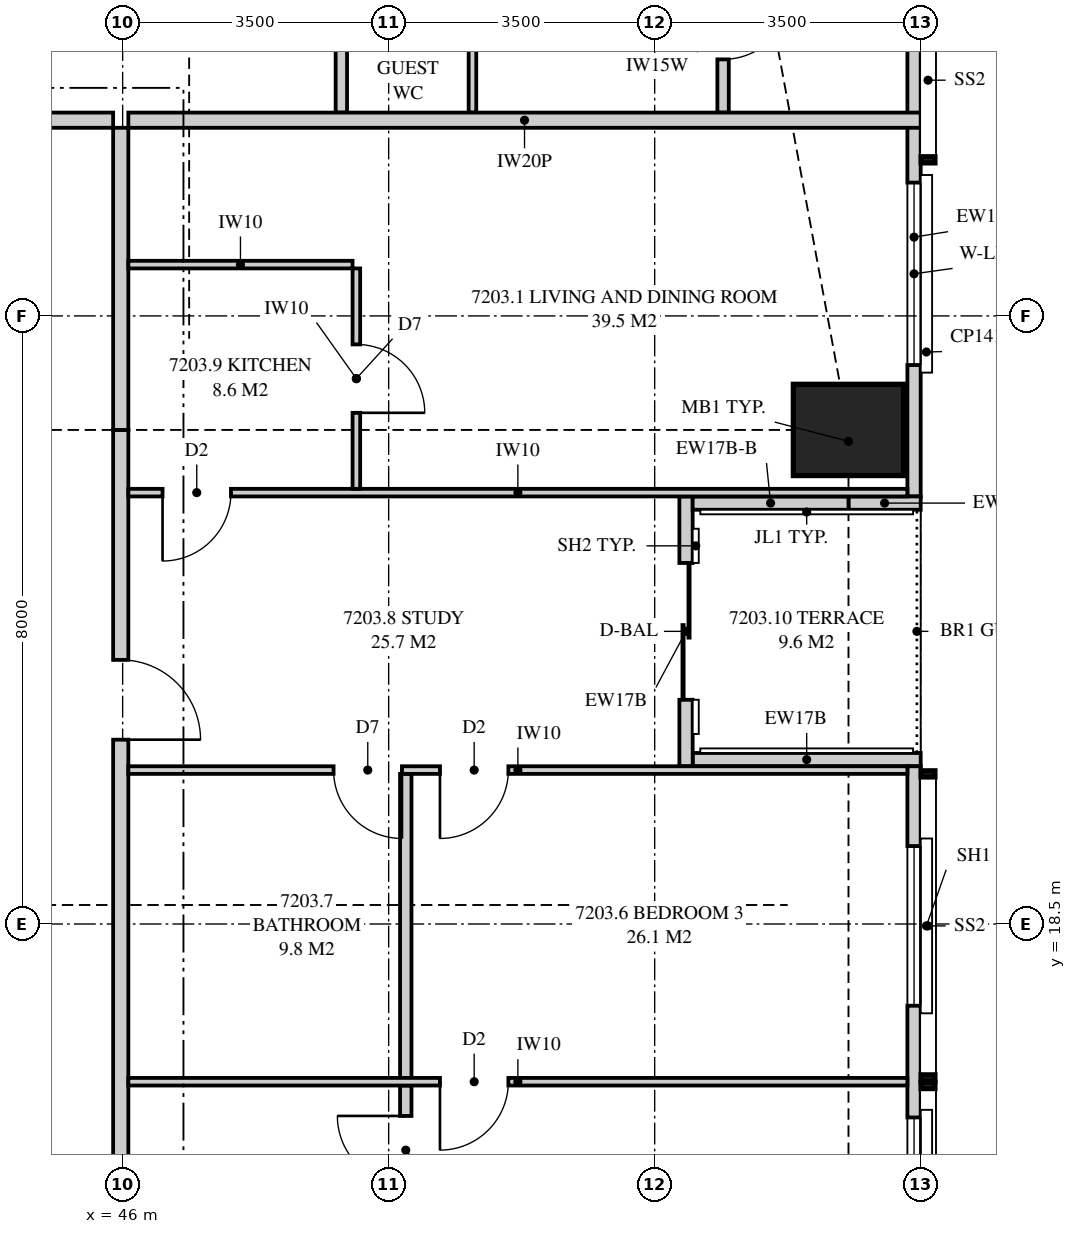
"""IFC4 building model, lengths in metres.
Left out: names, types, materials, properties, quantities, classifications, styles, units other than length and angle.
Written with IfcOpenShell. Run it as: python <this file> out.ifc"""

import sys

from ifc_helpers import new_model, si_unit, direction, frame, frame_2d, origin, origin_2d, place, context, subcontext, project, spatial, polyline, rectangle, outline, extrude, element, fill, save


model = new_model("IFC4")
c1 = context("Model", 3, precision=1e-05, world=origin(), true_north=direction((0.0, 1.0)))
c2 = subcontext(c1, "Body", "Model", "MODEL_VIEW")
j1 = project(units=[si_unit("LENGTHUNIT", "METRE"), si_unit("PLANEANGLEUNIT", "RADIAN")], contexts=[c1])
p1 = place(None, origin())
s1 = spatial("IfcSite", under=j1, at=p1, CompositionType="ELEMENT")
p2 = place(p1, origin())
s2 = spatial("IfcBuilding", under=s1, at=p2, CompositionType="ELEMENT")
p3 = place(p2, frame((0.0, 0.0, 263.85)))
s3 = spatial("IfcBuildingStorey", under=s2, at=p3, CompositionType="ELEMENT", Elevation=263.85)
p4 = place(p3, frame((55.55, 25.0, 0.0), z_axis=(0.0, 0.0, 1.0), x_axis=(1.0, 0.0, 0.0)))
e1 = element("IfcColumn", 1, at=p4, inside=s3, PredefinedType="COLUMN", context=c2, shape_type="SweptSolid", body=[
    extrude(rectangle(XDim=1.45, YDim=1.2, at=origin_2d()), origin(), (0.0, 0.0, 1.0), 3.9),
])
p5 = place(p3, frame((56.413, 3.051, 0.0), z_axis=(0.0, 0.0, 1.0), x_axis=(0.0, 1.0, 0.0)))
e2 = element("IfcWall", 2, at=p5, inside=s3, PredefinedType="SOLIDWALL", context=c2, shape_type="SweptSolid", body=[
    extrude(outline(polyline([(0.0, 0.0), (17.524, 0.0), (17.524, 2.7), (9.949, 2.7), (9.949, 3.62), (9.858, 3.62), (9.858, 2.7), (9.688, 2.7), (9.688, 3.62), (0.0, 3.62), (0.0, 0.0)])), frame((0.0, 0.087, 0.0), z_axis=(0.0, -1.0, 0.0), x_axis=(1.0, 0.0, 0.0)), (0.0, 0.0, 1.0), 0.175),
])
p6 = place(p5, frame((5.924, 0.0, 0.4)))
e3 = element("IfcOpeningElement", 3, at=p6, cuts=e2, PredefinedType="OPENING", context=c2, shape_type="SweptSolid", body=[
    extrude(rectangle(XDim=2.1, YDim=2.25, at=frame_2d((1.05, 1.125))), frame((0.0, 0.097, 0.0), z_axis=(0.0, -1.0, 0.0), x_axis=(1.0, 0.0, 0.0)), (0.0, 0.0, 1.0), 0.195),
])
p7 = place(p5, frame((10.804, 0.0, 0.4)))
e4 = element("IfcOpeningElement", 4, at=p7, cuts=e2, PredefinedType="OPENING", context=c2, shape_type="SweptSolid", body=[
    extrude(rectangle(XDim=2.1, YDim=2.25, at=frame_2d((1.05, 1.125))), frame((0.0, 0.097, 0.0), z_axis=(0.0, -1.0, 0.0), x_axis=(1.0, 0.0, 0.0)), (0.0, 0.0, 1.0), 0.195),
])
p8 = place(p5, frame((14.374, 0.0, 0.4)))
e5 = element("IfcOpeningElement", 5, at=p8, cuts=e2, PredefinedType="OPENING", context=c2, shape_type="SweptSolid", body=[
    extrude(rectangle(XDim=2.1, YDim=2.25, at=frame_2d((1.05, 1.125))), frame((0.0, 0.097, 0.0), z_axis=(0.0, -1.0, 0.0), x_axis=(1.0, 0.0, 0.0)), (0.0, 0.0, 1.0), 0.195),
])
p9 = place(p3, frame((56.413, 24.125, 0.0), z_axis=(0.0, 0.0, 1.0), x_axis=(0.0, 1.0, 0.0)))
e6 = element("IfcWall", 6, at=p9, inside=s3, PredefinedType="SOLIDWALL", context=c2, shape_type="SweptSolid", body=[
    extrude(outline(polyline([(0.0, 0.0), (6.824, 0.0), (6.824, 3.62), (1.083, 3.62), (1.083, 2.7), (1.018, 2.7), (1.018, 3.62), (0.875, 3.62), (0.875, 2.7), (0.0, 2.7), (0.0, 0.0)])), frame((0.0, 0.087, 0.0), z_axis=(0.0, -1.0, 0.0), x_axis=(1.0, 0.0, 0.0)), (0.0, 0.0, 1.0), 0.175),
])
p10 = place(p9, frame((1.729, 0.0, 0.4)))
e7 = element("IfcOpeningElement", 7, at=p10, cuts=e6, PredefinedType="OPENING", context=c2, shape_type="SweptSolid", body=[
    extrude(rectangle(XDim=2.4, YDim=2.0, at=frame_2d((1.2, 1.0))), frame((0.0, 0.097, 0.0), z_axis=(0.0, -1.0, 0.0), x_axis=(1.0, 0.0, 0.0)), (0.0, 0.0, 1.0), 0.195),
])
p11 = place(p3, frame((53.413, 20.575, 0.0), z_axis=(0.0, 0.0, 1.0), x_axis=(0.0, 1.0, 0.0)))
e8 = element("IfcWall", 8, at=p11, inside=s3, PredefinedType="SOLIDWALL", context=c2, shape_type="SweptSolid", body=[
    extrude(outline(polyline([(0.0, 0.0), (3.55, 0.0), (3.55, 3.02), (3.225, 3.02), (3.225, 3.62), (0.0, 3.62), (0.0, 0.0)])), frame((0.0, 0.087, 0.0), z_axis=(0.0, -1.0, 0.0), x_axis=(1.0, 0.0, 0.0)), (0.0, 0.0, 1.0), 0.175),
])
p12 = place(p11, frame((0.875, 0.0, 0.0)))
e9 = element("IfcOpeningElement", 9, at=p12, cuts=e8, PredefinedType="OPENING", context=c2, shape_type="SweptSolid", body=[
    extrude(rectangle(XDim=1.8, YDim=2.4, at=frame_2d((0.9, 1.2))), frame((0.0, 0.097, 0.0), z_axis=(0.0, -1.0, 0.0), x_axis=(1.0, 0.0, 0.0)), (0.0, 0.0, 1.0), 0.195),
])
p13 = place(p3, frame((56.5, 20.663, 0.0), z_axis=(0.0, 0.0, 1.0), x_axis=(-1.0, 0.0, 0.0)))
e10 = element("IfcWall", 10, at=p13, inside=s3, PredefinedType="SOLIDWALL", context=c2, shape_type="SweptSolid", body=[
    extrude(outline(polyline([(0.0, 0.0), (3.0, 0.0), (3.0, 3.62), (1.75, 3.62), (1.75, 2.7), (0.15, 2.7), (0.15, 3.62), (0.0, 3.62), (0.0, 0.0)])), frame((0.0, 0.087, 0.0), z_axis=(0.0, -1.0, 0.0), x_axis=(1.0, 0.0, 0.0)), (0.0, 0.0, 1.0), 0.175),
])
p14 = place(p3, frame((56.5, 24.038, 0.0), z_axis=(0.0, 0.0, 1.0), x_axis=(-1.0, 0.0, 0.0)))
e11 = element("IfcWall", 11, at=p14, inside=s3, PredefinedType="SOLIDWALL", context=c2, shape_type="SweptSolid", body=[
    extrude(outline(polyline([(0.0, 0.0), (0.95, 0.0), (0.95, 2.7), (0.15, 2.7), (0.15, 3.62), (0.0, 3.62), (0.0, 0.0)])), frame((0.0, 0.087, 0.0), z_axis=(0.0, -1.0, 0.0), x_axis=(1.0, 0.0, 0.0)), (0.0, 0.0, 1.0), 0.175),
])
p15 = place(p3, frame((55.55, 24.038, 0.0), z_axis=(0.0, 0.0, 1.0), x_axis=(-1.0, 0.0, 0.0)))
e12 = element("IfcWall", 12, at=p15, inside=s3, PredefinedType="SOLIDWALL", context=c2, shape_type="SweptSolid", body=[
    extrude(outline(polyline([(0.0, 0.0), (2.05, 0.0), (2.05, 3.02), (0.8, 3.02), (0.8, 2.7), (0.0, 2.7), (0.0, 0.0)])), frame((0.0, 0.087, 0.0), z_axis=(0.0, -1.0, 0.0), x_axis=(1.0, 0.0, 0.0)), (0.0, 0.0, 1.0), 0.175),
])
p16 = place(p3, frame((18.0, 29.075, 0.0), z_axis=(0.0, 0.0, 1.0), x_axis=(1.0, 0.0, 0.0)))
e13 = element("IfcWall", 13, at=p16, inside=s3, PredefinedType="PARTITIONING", context=c2, shape_type="SweptSolid", body=[
    extrude(outline(polyline([(0.0, 0.0), (27.875, 0.0), (27.875, 3.62), (27.875, 3.02), (27.565, 3.02), (27.565, 3.62), (20.56, 3.62), (20.56, 3.02), (17.94, 3.02), (17.94, 3.62), (10.935, 3.62), (10.935, 3.02), (8.315, 3.02), (8.315, 3.62), (3.517, 3.62), (3.517, 3.02), (2.192, 3.02), (2.192, 2.7), (0.256, 2.7), (0.256, 3.62), (0.0, 3.62), (0.0, 0.0)])), frame((0.0, 0.1, 0.0), z_axis=(0.0, -1.0, 0.0), x_axis=(1.0, 0.0, 0.0)), (0.0, 0.0, 1.0), 0.2),
])
p17 = place(p16, frame((18.75, 0.0, 0.0)))
e14 = element("IfcOpeningElement", 14, at=p17, cuts=e13, PredefinedType="OPENING", context=c2, shape_type="SweptSolid", body=[
    extrude(rectangle(XDim=1.05, YDim=2.2, at=frame_2d((0.525, 1.1))), frame((0.0, 0.11, 0.0), z_axis=(0.0, -1.0, 0.0), x_axis=(1.0, 0.0, 0.0)), (0.0, 0.0, 1.0), 0.22),
])
p18 = place(p3, frame((53.9, 31.4, 0.0), z_axis=(0.0, 0.0, 1.0), x_axis=(0.0, -1.0, 0.0)))
e15 = element("IfcWall", 15, at=p18, inside=s3, PredefinedType="PLUMBINGWALL", context=c2, shape_type="SweptSolid", body=[
    extrude(outline(polyline([(0.0, 0.0), (2.225, 0.0), (2.225, 3.62), (2.225, 2.7), (0.438, 2.7), (0.0, 2.7), (0.0, 3.62), (0.0, 0.0)])), frame((0.0, 0.075, 0.0), z_axis=(0.0, -1.0, 0.0), x_axis=(1.0, 0.0, 0.0)), (0.0, 0.0, 1.0), 0.15),
])
p19 = place(p18, frame((0.625, 0.0, 0.0)))
e16 = element("IfcOpeningElement", 16, at=p19, cuts=e15, PredefinedType="OPENING", context=c2, shape_type="SweptSolid", body=[
    extrude(rectangle(XDim=0.9, YDim=2.1, at=frame_2d((0.45, 1.05))), frame((0.0, 0.085, 0.0), z_axis=(0.0, -1.0, 0.0), x_axis=(1.0, 0.0, 0.0)), (0.0, 0.0, 1.0), 0.17),
])
p20 = place(p3, frame((50.603, 33.825, 0.0), z_axis=(0.0, 0.0, 1.0), x_axis=(0.0, -1.0, 0.0)))
e17 = element("IfcWall", 17, at=p20, inside=s3, PredefinedType="PARTITIONING", context=c2, shape_type="SweptSolid", body=[
    extrude(outline(polyline([(0.0, 0.0), (4.65, 0.0), (4.65, 3.62), (2.279, 3.62), (2.279, 2.7), (0.534, 2.7), (0.534, 3.62), (0.0, 3.62), (0.0, 0.0)])), frame((0.0, 0.05, 0.0), z_axis=(0.0, -1.0, 0.0), x_axis=(1.0, 0.0, 0.0)), (0.0, 0.0, 1.0), 0.1),
])
p21 = place(p20, frame((0.15, 0.0, 0.0)))
e18 = element("IfcOpeningElement", 18, at=p21, cuts=e17, PredefinedType="OPENING", context=c2, shape_type="SweptSolid", body=[
    extrude(rectangle(XDim=0.9, YDim=2.1, at=frame_2d((0.45, 1.05))), frame((0.0, 0.06, 0.0), z_axis=(0.0, -1.0, 0.0), x_axis=(1.0, 0.0, 0.0)), (0.0, 0.0, 1.0), 0.12),
])
p22 = place(p3, frame((46.075, 29.075, 0.0), z_axis=(0.0, 0.0, 1.0), x_axis=(1.0, 0.0, 0.0)))
e19 = element("IfcWall", 19, at=p22, inside=s3, PredefinedType="PARTITIONING", context=c2, shape_type="SweptSolid", body=[
    extrude(outline(polyline([(0.0, 0.0), (10.425, 0.0), (10.425, 3.62), (9.646, 3.62), (9.646, 2.7), (7.795, 2.7), (7.795, 3.62), (2.11, 3.62), (2.11, 3.02), (0.0, 3.02), (0.0, 3.62), (0.0, 0.0)])), frame((0.0, 0.1, 0.0), z_axis=(0.0, -1.0, 0.0), x_axis=(1.0, 0.0, 0.0)), (0.0, 0.0, 1.0), 0.2),
])
p23 = place(p3, frame((45.975, 13.0, 0.0), z_axis=(0.0, 0.0, 1.0), x_axis=(0.0, 1.0, 0.0)))
e20 = element("IfcWall", 20, at=p23, inside=s3, PredefinedType="PARTITIONING", context=c2, shape_type="SweptSolid", body=[
    extrude(outline(polyline([(0.0, 0.0), (12.0, 0.0), (12.0, 3.02), (10.69, 3.02), (10.69, 3.62), (7.06, 3.62), (7.06, 3.02), (4.44, 3.02), (4.44, 3.62), (1.31, 3.62), (1.31, 3.02), (0.0, 3.02), (0.0, 0.0)])), frame((0.0, 0.1, 0.0), z_axis=(0.0, -1.0, 0.0), x_axis=(1.0, 0.0, 0.0)), (0.0, 0.0, 1.0), 0.2),
])
p24 = place(p23, frame((7.925, 0.0, 0.0)))
e21 = element("IfcOpeningElement", 21, at=p24, cuts=e20, PredefinedType="OPENING", context=c2, shape_type="SweptSolid", body=[
    extrude(rectangle(XDim=1.05, YDim=2.2, at=frame_2d((0.525, 1.1))), frame((0.0, 0.11, 0.0), z_axis=(0.0, -1.0, 0.0), x_axis=(1.0, 0.0, 0.0)), (0.0, 0.0, 1.0), 0.22),
])
p25 = place(p3, frame((45.975, 25.0, 0.0), z_axis=(0.0, 0.0, 1.0), x_axis=(0.0, 1.0, 0.0)))
e22 = element("IfcWall", 22, at=p25, inside=s3, PredefinedType="PARTITIONING", context=c2, shape_type="SweptSolid", body=[
    extrude(rectangle(XDim=3.975, YDim=0.2, at=frame_2d((1.988, 0.0))), origin(), (0.0, 0.0, 1.0), 3.02),
])
p26 = place(p3, frame((56.325, 16.425, 0.0), z_axis=(0.0, 0.0, 1.0), x_axis=(-1.0, 0.0, 0.0)))
e23 = element("IfcWall", 23, at=p26, inside=s3, PredefinedType="PARTITIONING", context=c2, shape_type="SweptSolid", body=[
    extrude(outline(polyline([(0.0, 0.0), (10.25, 0.0), (10.25, 3.62), (1.635, 3.62), (1.635, 2.7), (0.0, 2.7), (0.0, 3.62), (0.0, 0.0)])), frame((0.0, 0.05, 0.0), z_axis=(0.0, -1.0, 0.0), x_axis=(1.0, 0.0, 0.0)), (0.0, 0.0, 1.0), 0.1),
])
p27 = place(p26, frame((5.25, 0.0, 0.0)))
e24 = element("IfcOpeningElement", 24, at=p27, cuts=e23, PredefinedType="OPENING", context=c2, shape_type="SweptSolid", body=[
    extrude(rectangle(XDim=0.9, YDim=2.1, at=frame_2d((0.45, 1.05))), frame((0.0, 0.06, 0.0), z_axis=(0.0, -1.0, 0.0), x_axis=(1.0, 0.0, 0.0)), (0.0, 0.0, 1.0), 0.12),
])
p28 = place(p3, frame((56.325, 20.525, 0.0), z_axis=(0.0, 0.0, 1.0), x_axis=(-1.0, 0.0, 0.0)))
e25 = element("IfcWall", 25, at=p28, inside=s3, PredefinedType="PARTITIONING", context=c2, shape_type="SweptSolid", body=[
    extrude(outline(polyline([(0.0, 0.0), (10.25, 0.0), (10.25, 3.62), (1.635, 3.62), (1.635, 2.7), (0.0, 2.7), (0.0, 3.62), (0.0, 0.0)])), frame((0.0, 0.05, 0.0), z_axis=(0.0, -1.0, 0.0), x_axis=(1.0, 0.0, 0.0)), (0.0, 0.0, 1.0), 0.1),
])
p29 = place(p28, frame((5.25, 0.0, 0.0)))
e26 = element("IfcOpeningElement", 26, at=p29, cuts=e25, PredefinedType="OPENING", context=c2, shape_type="SweptSolid", body=[
    extrude(rectangle(XDim=0.9, YDim=2.1, at=frame_2d((0.45, 1.05))), frame((0.0, 0.06, 0.0), z_axis=(0.0, -1.0, 0.0), x_axis=(1.0, 0.0, 0.0)), (0.0, 0.0, 1.0), 0.12),
])
p30 = place(p28, frame((6.65, 0.0, 0.0)))
e27 = element("IfcOpeningElement", 27, at=p30, cuts=e25, PredefinedType="OPENING", context=c2, shape_type="SweptSolid", body=[
    extrude(rectangle(XDim=0.9, YDim=2.1, at=frame_2d((0.45, 1.05))), frame((0.0, 0.06, 0.0), z_axis=(0.0, -1.0, 0.0), x_axis=(1.0, 0.0, 0.0)), (0.0, 0.0, 1.0), 0.12),
])
p31 = place(p3, frame((49.725, 12.175, 0.0), z_axis=(0.0, 0.0, 1.0), x_axis=(0.0, 1.0, 0.0)))
e28 = element("IfcWall", 28, at=p31, inside=s3, PredefinedType="PLUMBINGWALL", context=c2, shape_type="SweptSolid", body=[
    extrude(outline(polyline([(0.0, 0.0), (4.2, 0.0), (4.2, 3.62), (2.11, 3.62), (2.11, 3.02), (0.0, 3.02), (0.0, 3.62), (0.0, 0.0)])), frame((0.0, 0.075, 0.0), z_axis=(0.0, -1.0, 0.0), x_axis=(1.0, 0.0, 0.0)), (0.0, 0.0, 1.0), 0.15),
])
p32 = place(p31, frame((2.9, 0.0, 0.0)))
e29 = element("IfcOpeningElement", 29, at=p32, cuts=e28, PredefinedType="OPENING", context=c2, shape_type="SweptSolid", body=[
    extrude(rectangle(XDim=0.9, YDim=2.1, at=frame_2d((0.45, 1.05))), frame((0.0, 0.085, 0.0), z_axis=(0.0, -1.0, 0.0), x_axis=(1.0, 0.0, 0.0)), (0.0, 0.0, 1.0), 0.17),
])
p33 = place(p3, frame((49.725, 16.475, 0.0), z_axis=(0.0, 0.0, 1.0), x_axis=(0.0, 1.0, 0.0)))
e30 = element("IfcWall", 30, at=p33, inside=s3, PredefinedType="PLUMBINGWALL", context=c2, shape_type="SweptSolid", body=[
    extrude(outline(polyline([(0.0, 0.0), (4.0, 0.0), (4.0, 3.62), (3.56, 3.62), (3.56, 3.02), (0.99, 3.02), (0.99, 3.62), (0.0, 3.62), (0.0, 0.0)])), frame((0.0, 0.075, 0.0), z_axis=(0.0, -1.0, 0.0), x_axis=(1.0, 0.0, 0.0)), (0.0, 0.0, 1.0), 0.15),
])
p34 = place(p3, frame((56.325, 24.175, 0.0), z_axis=(0.0, 0.0, 1.0), x_axis=(-1.0, 0.0, 0.0)))
e31 = element("IfcWall", 31, at=p34, inside=s3, PredefinedType="PARTITIONING", context=c2, shape_type="SweptSolid", body=[
    extrude(outline(polyline([(0.0, 0.0), (10.25, 0.0), (10.25, 3.62), (10.25, 3.02), (1.635, 3.02), (1.635, 2.7), (0.0, 2.7), (0.0, 3.62), (0.0, 0.0)])), frame((0.0, 0.05, 0.0), z_axis=(0.0, -1.0, 0.0), x_axis=(1.0, 0.0, 0.0)), (0.0, 0.0, 1.0), 0.1),
])
p35 = place(p34, frame((8.9, 0.0, 0.0)))
e32 = element("IfcOpeningElement", 32, at=p35, cuts=e31, PredefinedType="OPENING", context=c2, shape_type="SweptSolid", body=[
    extrude(rectangle(XDim=0.9, YDim=2.1, at=frame_2d((0.45, 1.05))), frame((0.0, 0.06, 0.0), z_axis=(0.0, -1.0, 0.0), x_axis=(1.0, 0.0, 0.0)), (0.0, 0.0, 1.0), 0.12),
])
p36 = place(p3, frame((49.075, 24.225, 0.0), z_axis=(0.0, 0.0, 1.0), x_axis=(0.0, 1.0, 0.0)))
e33 = element("IfcWall", 33, at=p36, inside=s3, PredefinedType="PARTITIONING", context=c2, shape_type="SweptSolid", body=[
    extrude(outline(polyline([(0.0, 0.0), (2.9, 0.0), (2.9, 3.62), (2.035, 3.62), (2.035, 3.02), (0.0, 3.02), (0.0, 3.62), (0.0, 0.0)])), frame((0.0, 0.05, 0.0), z_axis=(0.0, -1.0, 0.0), x_axis=(1.0, 0.0, 0.0)), (0.0, 0.0, 1.0), 0.1),
])
p37 = place(p36, frame((1.0, 0.0, 0.0)))
e34 = element("IfcOpeningElement", 34, at=p37, cuts=e33, PredefinedType="OPENING", context=c2, shape_type="SweptSolid", body=[
    extrude(rectangle(XDim=0.9, YDim=2.1, at=frame_2d((0.45, 1.05))), frame((0.0, 0.06, 0.0), z_axis=(0.0, -1.0, 0.0), x_axis=(1.0, 0.0, 0.0)), (0.0, 0.0, 1.0), 0.12),
])
p38 = place(p3, frame((49.025, 27.175, 0.0), z_axis=(0.0, 0.0, 1.0), x_axis=(-1.0, 0.0, 0.0)))
e35 = element("IfcWall", 35, at=p38, inside=s3, PredefinedType="PARTITIONING", context=c2, shape_type="SweptSolid", body=[
    extrude(outline(polyline([(0.0, 0.0), (2.95, 0.0), (2.95, 3.62), (2.95, 3.02), (0.89, 3.02), (0.89, 3.62), (0.0, 3.62), (0.0, 0.0)])), frame((0.0, 0.05, 0.0), z_axis=(0.0, -1.0, 0.0), x_axis=(1.0, 0.0, 0.0)), (0.0, 0.0, 1.0), 0.1),
])
p39 = place(p3, frame((48.877, 29.175, 0.0), z_axis=(0.0, 0.0, 1.0), x_axis=(0.0, 1.0, 0.0)))
e36 = element("IfcWall", 36, at=p39, inside=s3, PredefinedType="PLUMBINGWALL", context=c2, shape_type="SweptSolid", body=[
    extrude(rectangle(XDim=2.0, YDim=0.15, at=frame_2d((1.0, 0.0))), origin(), (0.0, 0.0, 1.0), 3.62),
])
p40 = place(p7, origin())
e37 = element("IfcWindow", 37, at=p40, inside=s3, PartitioningType="SINGLE_PANEL", PredefinedType="WINDOW", context=c2, shape_type="SweptSolid", body=[
    extrude(rectangle(XDim=2.1, YDim=2.25, at=frame_2d((1.05, 1.125))), frame((0.0, 0.03, 0.0), z_axis=(0.0, -1.0, 0.0), x_axis=(1.0, 0.0, 0.0)), (0.0, 0.0, 1.0), 0.06),
])
fill(e4, e37)
p41 = place(p8, origin())
e38 = element("IfcWindow", 38, at=p41, inside=s3, PartitioningType="SINGLE_PANEL", PredefinedType="WINDOW", context=c2, shape_type="SweptSolid", body=[
    extrude(rectangle(XDim=2.1, YDim=2.25, at=frame_2d((1.05, 1.125))), frame((0.0, 0.03, 0.0), z_axis=(0.0, -1.0, 0.0), x_axis=(1.0, 0.0, 0.0)), (0.0, 0.0, 1.0), 0.06),
])
fill(e5, e38)
p42 = place(p12, origin())
e39 = element("IfcDoor", 39, at=p42, inside=s3, OperationType="SLIDING_TO_LEFT", PredefinedType="DOOR", context=c2, shape_type="SweptSolid", body=[
    extrude(rectangle(XDim=1.8, YDim=2.4, at=frame_2d((0.9, 1.2))), frame((0.0, 0.025, 0.0), z_axis=(0.0, -1.0, 0.0), x_axis=(1.0, 0.0, 0.0)), (0.0, 0.0, 1.0), 0.05),
])
fill(e9, e39)
p43 = place(p10, origin())
e40 = element("IfcWindow", 40, at=p43, inside=s3, PartitioningType="SINGLE_PANEL", PredefinedType="WINDOW", context=c2, shape_type="SweptSolid", body=[
    extrude(rectangle(XDim=2.4, YDim=2.0, at=frame_2d((1.2, 1.0))), frame((0.0, 0.03, 0.0), z_axis=(0.0, -1.0, 0.0), x_axis=(1.0, 0.0, 0.0)), (0.0, 0.0, 1.0), 0.06),
])
fill(e7, e40)
p44 = place(p19, origin())
e41 = element("IfcDoor", 41, at=p44, inside=s3, OperationType="SINGLE_SWING_LEFT", PredefinedType="DOOR", context=c2, shape_type="SweptSolid", body=[
    extrude(rectangle(XDim=0.9, YDim=2.1, at=frame_2d((0.45, 1.05))), frame((0.0, 0.025, 0.0), z_axis=(0.0, -1.0, 0.0), x_axis=(1.0, 0.0, 0.0)), (0.0, 0.0, 1.0), 0.05),
])
fill(e16, e41)
p45 = place(p24, frame((1.05, 0.0, 0.0), z_axis=(0.0, 0.0, 1.0), x_axis=(-1.0, 0.0, 0.0)))
e42 = element("IfcDoor", 42, at=p45, inside=s3, OperationType="SINGLE_SWING_RIGHT", PredefinedType="DOOR", context=c2, shape_type="SweptSolid", body=[
    extrude(rectangle(XDim=1.05, YDim=2.2, at=frame_2d((0.525, 1.1))), frame((0.0, 0.025, 0.0), z_axis=(0.0, -1.0, 0.0), x_axis=(1.0, 0.0, 0.0)), (0.0, 0.0, 1.0), 0.05),
])
fill(e21, e42)
p46 = place(p27, origin())
e43 = element("IfcDoor", 43, at=p46, inside=s3, OperationType="SINGLE_SWING_RIGHT", PredefinedType="DOOR", context=c2, shape_type="SweptSolid", body=[
    extrude(rectangle(XDim=0.9, YDim=2.1, at=frame_2d((0.45, 1.05))), frame((0.0, 0.025, 0.0), z_axis=(0.0, -1.0, 0.0), x_axis=(1.0, 0.0, 0.0)), (0.0, 0.0, 1.0), 0.05),
])
fill(e24, e43)
p47 = place(p32, origin())
e44 = element("IfcDoor", 44, at=p47, inside=s3, OperationType="SINGLE_SWING_RIGHT", PredefinedType="DOOR", context=c2, shape_type="SweptSolid", body=[
    extrude(rectangle(XDim=0.9, YDim=2.1, at=frame_2d((0.45, 1.05))), frame((0.0, 0.025, 0.0), z_axis=(0.0, -1.0, 0.0), x_axis=(1.0, 0.0, 0.0)), (0.0, 0.0, 1.0), 0.05),
])
fill(e29, e44)
p48 = place(p29, origin())
e45 = element("IfcDoor", 45, at=p48, inside=s3, OperationType="SINGLE_SWING_RIGHT", PredefinedType="DOOR", context=c2, shape_type="SweptSolid", body=[
    extrude(rectangle(XDim=0.9, YDim=2.1, at=frame_2d((0.45, 1.05))), frame((0.0, 0.025, 0.0), z_axis=(0.0, -1.0, 0.0), x_axis=(1.0, 0.0, 0.0)), (0.0, 0.0, 1.0), 0.05),
])
fill(e26, e45)
p49 = place(p30, origin())
e46 = element("IfcDoor", 46, at=p49, inside=s3, OperationType="SINGLE_SWING_LEFT", PredefinedType="DOOR", context=c2, shape_type="SweptSolid", body=[
    extrude(rectangle(XDim=0.9, YDim=2.1, at=frame_2d((0.45, 1.05))), frame((0.0, 0.025, 0.0), z_axis=(0.0, -1.0, 0.0), x_axis=(1.0, 0.0, 0.0)), (0.0, 0.0, 1.0), 0.05),
])
fill(e27, e46)
p50 = place(p35, origin())
e47 = element("IfcDoor", 47, at=p50, inside=s3, OperationType="SINGLE_SWING_RIGHT", PredefinedType="DOOR", context=c2, shape_type="SweptSolid", body=[
    extrude(rectangle(XDim=0.9, YDim=2.1, at=frame_2d((0.45, 1.05))), frame((0.0, 0.025, 0.0), z_axis=(0.0, -1.0, 0.0), x_axis=(1.0, 0.0, 0.0)), (0.0, 0.0, 1.0), 0.05),
])
fill(e32, e47)
p51 = place(p37, frame((0.9, 0.0, 0.0), z_axis=(0.0, 0.0, 1.0), x_axis=(-1.0, 0.0, 0.0)))
e48 = element("IfcDoor", 48, at=p51, inside=s3, OperationType="SINGLE_SWING_RIGHT", PredefinedType="DOOR", context=c2, shape_type="SweptSolid", body=[
    extrude(rectangle(XDim=0.9, YDim=2.1, at=frame_2d((0.45, 1.05))), frame((0.0, 0.025, 0.0), z_axis=(0.0, -1.0, 0.0), x_axis=(1.0, 0.0, 0.0)), (0.0, 0.0, 1.0), 0.05),
])
fill(e34, e48)
save(model, sys.argv[1])
